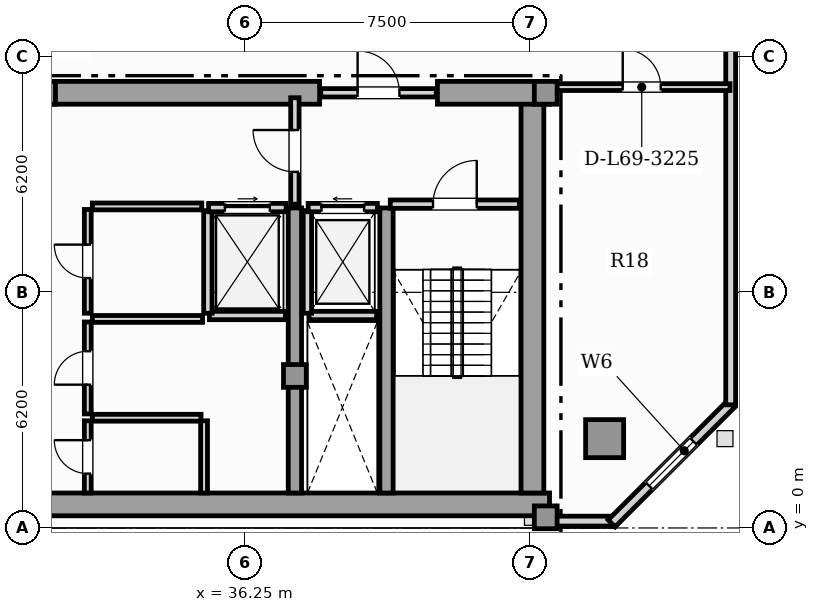
"""IFC4 building model, lengths in metres.
Left out: names, types, materials, properties, quantities, classifications, styles, units other than length and angle.
Written with IfcOpenShell. Run it as: python <this file> out.ifc"""

import sys

from ifc_helpers import new_model, si_unit, direction, frame, frame_2d, origin, origin_2d, place, context, subcontext, project, spatial, rectangle, hollow_rectangle, extrude, element, fill, save


model = new_model("IFC4")
c1 = context("Model", 3, precision=1e-05, world=origin(), true_north=direction((0.0, 1.0)))
c2 = subcontext(c1, "Body", "Model", "MODEL_VIEW")
j1 = project(units=[si_unit("LENGTHUNIT", "METRE"), si_unit("PLANEANGLEUNIT", "RADIAN")], contexts=[c1])
p1 = place(None, origin())
s1 = spatial("IfcSite", under=j1, at=p1, CompositionType="ELEMENT")
p2 = place(p1, origin())
s2 = spatial("IfcBuilding", under=s1, at=p2, CompositionType="ELEMENT")
p3 = place(p2, frame((0.0, 0.0, 281.05)))
s3 = spatial("IfcBuildingStorey", under=s2, at=p3, CompositionType="ELEMENT", Elevation=281.05)
p4 = place(p3, frame((13.25, 0.62, 0.0), z_axis=(0.0, 0.0, 1.0), x_axis=(1.0, 0.0, 0.0)))
e1 = element("IfcWall", 1, at=p4, inside=s3, PredefinedType="SHEAR", context=c2, shape_type="SweptSolid", body=[
    extrude(rectangle(XDim=31.0, YDim=0.6, at=frame_2d((15.5, 0.0))), origin(), (0.0, 0.0, 1.0), 3.65),
])
p5 = place(p3, frame((43.8, 0.92, 0.0), z_axis=(0.0, 0.0, 1.0), x_axis=(0.0, 1.0, 0.0)))
e2 = element("IfcWall", 2, at=p5, inside=s3, PredefinedType="SHEAR", context=c2, shape_type="SweptSolid", body=[
    extrude(rectangle(XDim=10.53, YDim=0.6, at=frame_2d((5.265, 0.0))), origin(), (0.0, 0.0, 1.0), 3.65),
])
p6 = place(p3, frame((30.9, 11.45, 0.0), z_axis=(0.0, 0.0, 1.0), x_axis=(1.0, 0.0, 0.0)))
e3 = element("IfcWall", 3, at=p6, inside=s3, PredefinedType="SHEAR", context=c2, shape_type="SweptSolid", body=[
    extrude(rectangle(XDim=7.3, YDim=0.6, at=frame_2d((3.65, 0.0))), origin(), (0.0, 0.0, 1.0), 3.65),
])
p7 = place(p3, frame((41.3, 11.45, 0.0), z_axis=(0.0, 0.0, 1.0), x_axis=(1.0, 0.0, 0.0)))
e4 = element("IfcWall", 4, at=p7, inside=s3, PredefinedType="SHEAR", context=c2, shape_type="SweptSolid", body=[
    extrude(rectangle(XDim=2.95, YDim=0.6, at=frame_2d((1.475, 0.0))), origin(), (0.0, 0.0, 1.0), 3.65),
])
for number, where, z_axis, x_axis in (
    (5, (37.55, 0.92, 0.0), (0.0, 0.0, 1.0), (0.0, 1.0, 0.0)),
    (6, (39.96, 0.92, 0.0), (0.0, 0.0, 1.0), (0.0, 1.0, 0.0)),
):
    element("IfcWall", number, at=place(p3, frame(where, z_axis=z_axis, x_axis=x_axis)), inside=s3, PredefinedType="SHEAR", context=c2, shape_type="SweptSolid", body=[
        extrude(rectangle(XDim=7.5, YDim=0.35, at=frame_2d((3.75, 0.0))), origin(), (0.0, 0.0, 1.0), 3.65),
    ])
for number, where, z_axis, x_axis in (
    (7, (44.15, 0.28, 0.0), (0.0, 0.0, 1.0), (1.0, 0.0, 0.0)),
    (8, (44.15, 11.45, 0.0), (0.0, 0.0, 1.0), (1.0, 0.0, 0.0)),
    (9, (37.55, 4.0, 0.0), (0.0, 0.0, 1.0), (1.0, 0.0, 0.0)),
    (10, (30.95, 11.45, 0.0), (0.0, 0.0, 1.0), (1.0, 0.0, 0.0)),
):
    element("IfcColumn", number, at=place(p3, frame(where, z_axis=z_axis, x_axis=x_axis)), inside=s3, PredefinedType="COLUMN", context=c2, shape_type="SweptSolid", body=[
        extrude(rectangle(XDim=0.6, YDim=0.6, at=origin_2d()), origin(), (0.0, 0.0, 1.0), 3.85),
    ])
p8 = place(p3, frame((45.7, 2.35, 0.0), z_axis=(0.0, 0.0, 1.0), x_axis=(1.0, 0.0, 0.0)))
e11 = element("IfcColumn", 11, at=p8, inside=s3, PredefinedType="USERDEFINED", context=c2, shape_type="SweptSolid", body=[
    extrude(hollow_rectangle(XDim=1.0, YDim=1.0, WallThickness=0.06, at=origin_2d()), origin(), (0.0, 0.0, 1.0), 3.85),
])
p9 = place(p3, frame((44.25, 0.18, 0.0), z_axis=(0.0, 0.0, 1.0), x_axis=(1.0, 0.0, 0.0)))
e12 = element("IfcWall", 12, at=p9, inside=s3, PredefinedType="SOLIDWALL", context=c2, shape_type="SweptSolid", body=[
    extrude(rectangle(XDim=1.657, YDim=0.26, at=frame_2d((0.829, 0.0))), origin(), (0.0, 0.0, 1.0), 3.65),
])
p10 = place(p3, frame((45.883, 0.12, 0.0), z_axis=(0.0, 0.0, 1.0), x_axis=(0.707079321262, 0.707134240044, 0.0)))
e13 = element("IfcWall", 13, at=p10, inside=s3, PredefinedType="SOLIDWALL", context=c2, shape_type="SweptSolid", body=[
    extrude(rectangle(XDim=4.446, YDim=0.26, at=frame_2d((2.223, 0.0))), origin(), (0.0, 0.0, 1.0), 3.65),
])
p11 = place(p10, frame((1.398, 0.0, 0.88)))
e14 = element("IfcOpeningElement", 14, at=p11, cuts=e13, PredefinedType="OPENING", context=c2, shape_type="SweptSolid", body=[
    extrude(rectangle(XDim=1.65, YDim=2.0, at=frame_2d((0.825, 1.0))), frame((0.0, 0.14, 0.0), z_axis=(0.0, -1.0, 0.0), x_axis=(1.0, 0.0, 0.0)), (0.0, 0.0, 1.0), 0.28),
])
p12 = place(p3, frame((49.017, 3.24, 0.0), z_axis=(0.0, 0.0, 1.0), x_axis=(0.0, 1.0, 0.0)))
e15 = element("IfcWall", 15, at=p12, inside=s3, PredefinedType="SOLIDWALL", context=c2, shape_type="SweptSolid", body=[
    extrude(rectangle(XDim=14.836, YDim=0.26, at=frame_2d((7.418, 0.0))), origin(), (0.0, 0.0, 1.0), 3.65),
])
p13 = place(p3, frame((37.92, 5.59, 0.0), z_axis=(0.0, 0.0, 1.0), x_axis=(1.0, 0.0, 0.0)))
e16 = element("IfcWall", 16, at=p13, inside=s3, PredefinedType="SOLIDWALL", context=c2, shape_type="SweptSolid", body=[
    extrude(rectangle(XDim=1.78, YDim=0.22, at=frame_2d((0.89, 0.0))), origin(), (0.0, 0.0, 1.0), 3.65),
])
p14 = place(p3, frame((37.88, 5.65, 0.0), z_axis=(0.0, 0.0, 1.0), x_axis=(0.0, 1.0, 0.0)))
e17 = element("IfcWall", 17, at=p14, inside=s3, PredefinedType="SOLIDWALL", context=c2, shape_type="SweptSolid", body=[
    extrude(rectangle(XDim=2.7, YDim=0.22, at=frame_2d((1.35, 0.0))), origin(), (0.0, 0.0, 1.0), 3.65),
])
p15 = place(p3, frame((37.9, 8.43, 0.0), z_axis=(0.0, 0.0, 1.0), x_axis=(1.0, 0.0, 0.0)))
e18 = element("IfcWall", 18, at=p15, inside=s3, PredefinedType="SOLIDWALL", context=c2, shape_type="SweptSolid", body=[
    extrude(rectangle(XDim=1.82, YDim=0.22, at=frame_2d((0.91, 0.0))), origin(), (0.0, 0.0, 1.0), 3.65),
])
p16 = place(p15, frame((0.35, 0.0, 0.0)))
e19 = element("IfcOpeningElement", 19, at=p16, cuts=e18, PredefinedType="OPENING", context=c2, shape_type="SweptSolid", body=[
    extrude(rectangle(XDim=1.12, YDim=2.25, at=frame_2d((0.56, 1.125))), frame((0.0, 0.12, 0.0), z_axis=(0.0, -1.0, 0.0), x_axis=(1.0, 0.0, 0.0)), (0.0, 0.0, 1.0), 0.24),
])
p17 = place(p3, frame((35.3, 5.59, 0.0), z_axis=(0.0, 0.0, 1.0), x_axis=(1.0, 0.0, 0.0)))
e20 = element("IfcWall", 20, at=p17, inside=s3, PredefinedType="SOLIDWALL", context=c2, shape_type="SweptSolid", body=[
    extrude(rectangle(XDim=2.0, YDim=0.22, at=frame_2d((1.0, 0.0))), origin(), (0.0, 0.0, 1.0), 3.65),
])
p18 = place(p3, frame((35.26, 5.65, 0.0), z_axis=(0.0, 0.0, 1.0), x_axis=(0.0, 1.0, 0.0)))
e21 = element("IfcWall", 21, at=p18, inside=s3, PredefinedType="SOLIDWALL", context=c2, shape_type="SweptSolid", body=[
    extrude(rectangle(XDim=2.7, YDim=0.22, at=frame_2d((1.35, 0.0))), origin(), (0.0, 0.0, 1.0), 3.65),
])
p19 = place(p3, frame((35.28, 8.43, 0.0), z_axis=(0.0, 0.0, 1.0), x_axis=(1.0, 0.0, 0.0)))
e22 = element("IfcWall", 22, at=p19, inside=s3, PredefinedType="SOLIDWALL", context=c2, shape_type="SweptSolid", body=[
    extrude(rectangle(XDim=2.04, YDim=0.22, at=frame_2d((1.02, 0.0))), origin(), (0.0, 0.0, 1.0), 3.65),
])
p20 = place(p19, frame((0.43, 0.0, 0.0)))
e23 = element("IfcOpeningElement", 23, at=p20, cuts=e22, PredefinedType="OPENING", context=c2, shape_type="SweptSolid", body=[
    extrude(rectangle(XDim=1.18, YDim=2.2, at=frame_2d((0.59, 1.1))), frame((0.0, 0.12, 0.0), z_axis=(0.0, -1.0, 0.0), x_axis=(1.0, 0.0, 0.0)), (0.0, 0.0, 1.0), 0.24),
])
p21 = place(p3, frame((40.06, 8.52, 0.0), z_axis=(0.0, 0.0, 1.0), x_axis=(1.0, 0.0, 0.0)))
e24 = element("IfcWall", 24, at=p21, inside=s3, PredefinedType="SOLIDWALL", context=c2, shape_type="SweptSolid", body=[
    extrude(rectangle(XDim=3.4, YDim=0.22, at=frame_2d((1.7, 0.0))), origin(), (0.0, 0.0, 1.0), 3.65),
])
p22 = place(p21, frame((1.125, 0.0, 0.0)))
e25 = element("IfcOpeningElement", 25, at=p22, cuts=e24, PredefinedType="OPENING", context=c2, shape_type="SweptSolid", body=[
    extrude(rectangle(XDim=1.15, YDim=2.2, at=frame_2d((0.575, 1.1))), frame((0.0, 0.12, 0.0), z_axis=(0.0, -1.0, 0.0), x_axis=(1.0, 0.0, 0.0)), (0.0, 0.0, 1.0), 0.24),
])
p23 = place(p3, frame((37.55, 8.52, 0.0), z_axis=(0.0, 0.0, 1.0), x_axis=(0.0, 1.0, 0.0)))
e26 = element("IfcWall", 26, at=p23, inside=s3, PredefinedType="SOLIDWALL", context=c2, shape_type="SweptSolid", body=[
    extrude(rectangle(XDim=2.8, YDim=0.22, at=frame_2d((1.4, 0.0))), origin(), (0.0, 0.0, 1.0), 3.105),
])
p24 = place(p23, frame((0.85, 0.0, 0.0)))
e27 = element("IfcOpeningElement", 27, at=p24, cuts=e26, PredefinedType="OPENING", context=c2, shape_type="SweptSolid", body=[
    extrude(rectangle(XDim=1.1, YDim=2.2, at=frame_2d((0.55, 1.1))), frame((0.0, 0.12, 0.0), z_axis=(0.0, -1.0, 0.0), x_axis=(1.0, 0.0, 0.0)), (0.0, 0.0, 1.0), 0.24),
])
p25 = place(p3, frame((38.23, 11.45, 0.0), z_axis=(0.0, 0.0, 1.0), x_axis=(1.0, 0.0, 0.0)))
e28 = element("IfcWall", 28, at=p25, inside=s3, PredefinedType="SOLIDWALL", context=c2, shape_type="SweptSolid", body=[
    extrude(rectangle(XDim=3.04, YDim=0.22, at=frame_2d((1.52, 0.0))), origin(), (0.0, 0.0, 1.0), 3.65),
])
p26 = place(p25, frame((0.97, 0.0, 0.0)))
e29 = element("IfcOpeningElement", 29, at=p26, cuts=e28, PredefinedType="OPENING", context=c2, shape_type="SweptSolid", body=[
    extrude(rectangle(XDim=1.1, YDim=2.2, at=frame_2d((0.55, 1.1))), frame((0.0, 0.12, 0.0), z_axis=(0.0, -1.0, 0.0), x_axis=(1.0, 0.0, 0.0)), (0.0, 0.0, 1.0), 0.24),
])
p27 = place(p3, frame((32.1, 0.92, 0.0), z_axis=(0.0, 0.0, 1.0), x_axis=(0.0, 1.0, 0.0)))
e30 = element("IfcWall", 30, at=p27, inside=s3, PredefinedType="PARTITIONING", context=c2, shape_type="SweptSolid", body=[
    extrude(rectangle(XDim=1.9, YDim=0.18, at=frame_2d((0.95, 0.0))), origin(), (0.0, 0.0, 1.0), 3.65),
])
p28 = place(p27, frame((0.51, 0.0, 0.0)))
e31 = element("IfcOpeningElement", 31, at=p28, cuts=e30, PredefinedType="OPENING", context=c2, shape_type="SweptSolid", body=[
    extrude(rectangle(XDim=0.88, YDim=2.05, at=frame_2d((0.44, 1.025))), frame((0.0, 0.1, 0.0), z_axis=(0.0, -1.0, 0.0), x_axis=(1.0, 0.0, 0.0)), (0.0, 0.0, 1.0), 0.2),
])
p29 = place(p3, frame((32.22, 2.9, 0.0), z_axis=(0.0, 0.0, 1.0), x_axis=(1.0, 0.0, 0.0)))
e32 = element("IfcWall", 32, at=p29, inside=s3, PredefinedType="PARTITIONING", context=c2, shape_type="SweptSolid", body=[
    extrude(rectangle(XDim=2.86, YDim=0.18, at=frame_2d((1.43, 0.0))), origin(), (0.0, 0.0, 1.0), 3.65),
])
p30 = place(p3, frame((35.16, 0.92, 0.0), z_axis=(0.0, 0.0, 1.0), x_axis=(0.0, 1.0, 0.0)))
e33 = element("IfcWall", 33, at=p30, inside=s3, PredefinedType="PARTITIONING", context=c2, shape_type="SweptSolid", body=[
    extrude(rectangle(XDim=1.9, YDim=0.18, at=frame_2d((0.95, 0.0))), origin(), (0.0, 0.0, 1.0), 3.65),
])
p31 = place(p3, frame((32.1, 3.0, 0.0), z_axis=(0.0, 0.0, 1.0), x_axis=(0.0, 1.0, 0.0)))
e34 = element("IfcWall", 34, at=p31, inside=s3, PredefinedType="PARTITIONING", context=c2, shape_type="SweptSolid", body=[
    extrude(rectangle(XDim=2.42, YDim=0.18, at=frame_2d((1.21, 0.0))), origin(), (0.0, 0.0, 1.0), 3.65),
])
p32 = place(p31, frame((0.77, 0.0, 0.0)))
e35 = element("IfcOpeningElement", 35, at=p32, cuts=e34, PredefinedType="OPENING", context=c2, shape_type="SweptSolid", body=[
    extrude(rectangle(XDim=0.88, YDim=2.05, at=frame_2d((0.44, 1.025))), frame((0.0, 0.1, 0.0), z_axis=(0.0, -1.0, 0.0), x_axis=(1.0, 0.0, 0.0)), (0.0, 0.0, 1.0), 0.2),
])
p33 = place(p3, frame((32.22, 5.5, 0.0), z_axis=(0.0, 0.0, 1.0), x_axis=(1.0, 0.0, 0.0)))
e36 = element("IfcWall", 36, at=p33, inside=s3, PredefinedType="PARTITIONING", context=c2, shape_type="SweptSolid", body=[
    extrude(rectangle(XDim=2.9, YDim=0.18, at=frame_2d((1.45, 0.0))), origin(), (0.0, 0.0, 1.0), 3.65),
])
p34 = place(p3, frame((32.1, 5.65, 0.0), z_axis=(0.0, 0.0, 1.0), x_axis=(0.0, 1.0, 0.0)))
e37 = element("IfcWall", 37, at=p34, inside=s3, PredefinedType="PARTITIONING", context=c2, shape_type="SweptSolid", body=[
    extrude(rectangle(XDim=2.73, YDim=0.18, at=frame_2d((1.365, 0.0))), origin(), (0.0, 0.0, 1.0), 3.65),
])
p35 = place(p34, frame((0.925, 0.0, 0.0)))
e38 = element("IfcOpeningElement", 38, at=p35, cuts=e37, PredefinedType="OPENING", context=c2, shape_type="SweptSolid", body=[
    extrude(rectangle(XDim=0.88, YDim=2.05, at=frame_2d((0.44, 1.025))), frame((0.0, 0.1, 0.0), z_axis=(0.0, -1.0, 0.0), x_axis=(1.0, 0.0, 0.0)), (0.0, 0.0, 1.0), 0.2),
])
p36 = place(p3, frame((32.22, 8.46, 0.0), z_axis=(0.0, 0.0, 1.0), x_axis=(1.0, 0.0, 0.0)))
e39 = element("IfcWall", 39, at=p36, inside=s3, PredefinedType="PARTITIONING", context=c2, shape_type="SweptSolid", body=[
    extrude(rectangle(XDim=2.88, YDim=0.18, at=frame_2d((1.44, 0.0))), origin(), (0.0, 0.0, 1.0), 3.65),
])
p37 = place(p3, frame((44.355, 11.6, 0.0), z_axis=(0.0, 0.0, 1.0), x_axis=(1.0, 0.0, 0.0)))
e40 = element("IfcWall", 40, at=p37, inside=s3, PredefinedType="PARTITIONING", context=c2, shape_type="SweptSolid", body=[
    extrude(rectangle(XDim=4.642, YDim=0.18, at=frame_2d((2.321, 0.0))), origin(), (0.0, 0.0, 1.0), 3.65),
])
p38 = place(p37, frame((1.821, 0.0, 0.0)))
e41 = element("IfcOpeningElement", 41, at=p38, cuts=e40, PredefinedType="OPENING", context=c2, shape_type="SweptSolid", body=[
    extrude(rectangle(XDim=1.0, YDim=2.15, at=frame_2d((0.5, 1.075))), frame((0.0, 0.1, 0.0), z_axis=(0.0, -1.0, 0.0), x_axis=(1.0, 0.0, 0.0)), (0.0, 0.0, 1.0), 0.2),
])
p39 = place(p11, origin())
e42 = element("IfcWindow", 42, at=p39, inside=s3, PartitioningType="SINGLE_PANEL", PredefinedType="WINDOW", context=c2, shape_type="SweptSolid", body=[
    extrude(rectangle(XDim=1.65, YDim=2.0, at=frame_2d((0.825, 1.0))), frame((0.0, 0.03, 0.0), z_axis=(0.0, -1.0, 0.0), x_axis=(1.0, 0.0, 0.0)), (0.0, 0.0, 1.0), 0.06),
])
fill(e14, e42)
p40 = place(p16, origin())
e43 = element("IfcDoor", 43, at=p40, inside=s3, OperationType="SLIDING_TO_LEFT", PredefinedType="DOOR", context=c2, shape_type="SweptSolid", body=[
    extrude(rectangle(XDim=1.12, YDim=2.25, at=frame_2d((0.56, 1.125))), frame((0.0, 0.025, 0.0), z_axis=(0.0, -1.0, 0.0), x_axis=(1.0, 0.0, 0.0)), (0.0, 0.0, 1.0), 0.05),
])
fill(e19, e43)
p41 = place(p20, origin())
e44 = element("IfcDoor", 44, at=p41, inside=s3, OperationType="SLIDING_TO_RIGHT", PredefinedType="DOOR", context=c2, shape_type="SweptSolid", body=[
    extrude(rectangle(XDim=1.18, YDim=2.2, at=frame_2d((0.59, 1.1))), frame((0.0, 0.025, 0.0), z_axis=(0.0, -1.0, 0.0), x_axis=(1.0, 0.0, 0.0)), (0.0, 0.0, 1.0), 0.05),
])
fill(e23, e44)
p42 = place(p22, origin())
e45 = element("IfcDoor", 45, at=p42, inside=s3, OperationType="SINGLE_SWING_RIGHT", PredefinedType="DOOR", context=c2, shape_type="SweptSolid", body=[
    extrude(rectangle(XDim=1.15, YDim=2.2, at=frame_2d((0.575, 1.1))), frame((0.0, 0.025, 0.0), z_axis=(0.0, -1.0, 0.0), x_axis=(1.0, 0.0, 0.0)), (0.0, 0.0, 1.0), 0.05),
])
fill(e25, e45)
p43 = place(p24, origin())
e46 = element("IfcDoor", 46, at=p43, inside=s3, OperationType="SINGLE_SWING_RIGHT", PredefinedType="DOOR", context=c2, shape_type="SweptSolid", body=[
    extrude(rectangle(XDim=1.1, YDim=2.2, at=frame_2d((0.55, 1.1))), frame((0.0, 0.025, 0.0), z_axis=(0.0, -1.0, 0.0), x_axis=(1.0, 0.0, 0.0)), (0.0, 0.0, 1.0), 0.05),
])
fill(e27, e46)
p44 = place(p26, origin())
e47 = element("IfcDoor", 47, at=p44, inside=s3, OperationType="SINGLE_SWING_LEFT", PredefinedType="DOOR", context=c2, shape_type="SweptSolid", body=[
    extrude(rectangle(XDim=1.1, YDim=2.2, at=frame_2d((0.55, 1.1))), frame((0.0, 0.025, 0.0), z_axis=(0.0, -1.0, 0.0), x_axis=(1.0, 0.0, 0.0)), (0.0, 0.0, 1.0), 0.05),
])
fill(e29, e47)
p45 = place(p28, origin())
e48 = element("IfcDoor", 48, at=p45, inside=s3, OperationType="SINGLE_SWING_RIGHT", PredefinedType="DOOR", context=c2, shape_type="SweptSolid", body=[
    extrude(rectangle(XDim=0.88, YDim=2.05, at=frame_2d((0.44, 1.025))), frame((0.0, 0.025, 0.0), z_axis=(0.0, -1.0, 0.0), x_axis=(1.0, 0.0, 0.0)), (0.0, 0.0, 1.0), 0.05),
])
fill(e31, e48)
p46 = place(p32, origin())
e49 = element("IfcDoor", 49, at=p46, inside=s3, OperationType="SINGLE_SWING_LEFT", PredefinedType="DOOR", context=c2, shape_type="SweptSolid", body=[
    extrude(rectangle(XDim=0.88, YDim=2.05, at=frame_2d((0.44, 1.025))), frame((0.0, 0.025, 0.0), z_axis=(0.0, -1.0, 0.0), x_axis=(1.0, 0.0, 0.0)), (0.0, 0.0, 1.0), 0.05),
])
fill(e35, e49)
p47 = place(p35, origin())
e50 = element("IfcDoor", 50, at=p47, inside=s3, OperationType="SINGLE_SWING_RIGHT", PredefinedType="DOOR", context=c2, shape_type="SweptSolid", body=[
    extrude(rectangle(XDim=0.88, YDim=2.05, at=frame_2d((0.44, 1.025))), frame((0.0, 0.025, 0.0), z_axis=(0.0, -1.0, 0.0), x_axis=(1.0, 0.0, 0.0)), (0.0, 0.0, 1.0), 0.05),
])
fill(e38, e50)
p48 = place(p38, origin())
e51 = element("IfcDoor", 51, at=p48, inside=s3, OperationType="SINGLE_SWING_LEFT", PredefinedType="DOOR", context=c2, shape_type="SweptSolid", body=[
    extrude(rectangle(XDim=1.0, YDim=2.15, at=frame_2d((0.5, 1.075))), frame((0.0, 0.025, 0.0), z_axis=(0.0, -1.0, 0.0), x_axis=(1.0, 0.0, 0.0)), (0.0, 0.0, 1.0), 0.05),
])
fill(e41, e51)
save(model, sys.argv[1])
